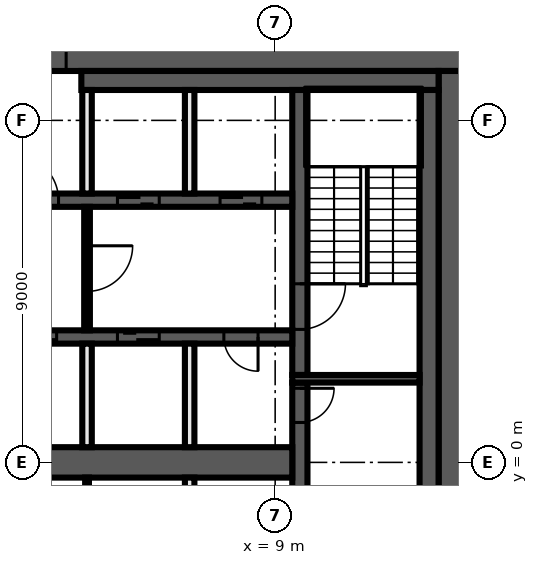
"""IFC4 building model, lengths in metres.
Left out: names, types, materials, properties, quantities, classifications, styles, units other than length and angle.
Written with IfcOpenShell. Run it as: python <this file> out.ifc"""

import sys

from ifc_helpers import new_model, si_unit, direction, frame, frame_2d, origin, place, context, subcontext, project, spatial, rectangle, extrude, element, fill, save


model = new_model("IFC4")
c1 = context("Model", 3, precision=1e-05, world=origin(), true_north=direction((0.0, 1.0)))
c2 = subcontext(c1, "Body", "Model", "MODEL_VIEW")
j1 = project(units=[si_unit("LENGTHUNIT", "METRE"), si_unit("PLANEANGLEUNIT", "RADIAN")], contexts=[c1])
p1 = place(None, origin())
s1 = spatial("IfcSite", under=j1, at=p1, CompositionType="ELEMENT")
p2 = place(p1, origin())
s2 = spatial("IfcBuilding", under=s1, at=p2, CompositionType="ELEMENT")
p3 = place(p2, frame((0.0, 0.0, 237.0)))
s3 = spatial("IfcBuildingStorey", under=s2, at=p3, CompositionType="ELEMENT", Elevation=237.0)
p4 = place(p3, frame((-14.0, 10.65, 0.0), z_axis=(0.0, 0.0, 1.0), x_axis=(1.0, 0.0, 0.0)))
e1 = element("IfcWall", 1, at=p4, inside=s3, PredefinedType="SHEAR", context=c2, shape_type="SweptSolid", body=[
    extrude(rectangle(XDim=28.0, YDim=0.7, at=frame_2d((14.0, 0.0))), origin(), (0.0, 0.0, 1.0), 3.82),
])
p5 = place(p4, frame((15.9, 0.0, 0.0)))
e2 = element("IfcOpeningElement", 2, at=p5, cuts=e1, PredefinedType="OPENING", context=c2, shape_type="SweptSolid", body=[
    extrude(rectangle(XDim=1.6, YDim=2.1, at=frame_2d((0.8, 1.05))), frame((0.0, 0.36, 0.0), z_axis=(0.0, -1.0, 0.0), x_axis=(1.0, 0.0, 0.0)), (0.0, 0.0, 1.0), 0.72),
])
p6 = place(p3, frame((13.65, 10.3, 0.0), z_axis=(0.0, 0.0, 1.0), x_axis=(0.0, -1.0, 0.0)))
e3 = element("IfcWall", 3, at=p6, inside=s3, PredefinedType="SHEAR", context=c2, shape_type="SweptSolid", body=[
    extrude(rectangle(XDim=20.6, YDim=0.7, at=frame_2d((10.3, 0.0))), origin(), (0.0, 0.0, 1.0), 3.82),
])
p7 = place(p3, frame((3.9, 10.05, 0.0), z_axis=(0.0, 0.0, 1.0), x_axis=(1.0, 0.0, 0.0)))
e4 = element("IfcWall", 4, at=p7, inside=s3, PredefinedType="SHEAR", context=c2, shape_type="SweptSolid", body=[
    extrude(rectangle(XDim=9.4, YDim=0.5, at=frame_2d((4.7, 0.0))), origin(), (0.0, 0.0, 1.0), 3.82),
])
p8 = place(p3, frame((13.05, 9.8, 0.0), z_axis=(0.0, 0.0, 1.0), x_axis=(0.0, -1.0, 0.0)))
e5 = element("IfcWall", 5, at=p8, inside=s3, PredefinedType="SHEAR", context=c2, shape_type="SweptSolid", body=[
    extrude(rectangle(XDim=19.6, YDim=0.5, at=frame_2d((9.8, 0.0))), origin(), (0.0, 0.0, 1.0), 3.82),
])
p9 = place(p3, frame((9.65, 2.1, 0.0), z_axis=(0.0, 0.0, 1.0), x_axis=(0.0, -1.0, 0.0)))
e6 = element("IfcWall", 6, at=p9, inside=s3, PredefinedType="SHEAR", context=c2, shape_type="SweptSolid", body=[
    extrude(rectangle(XDim=4.2, YDim=0.4, at=frame_2d((2.1, 0.0))), origin(), (0.0, 0.0, 1.0), 3.82),
])
p10 = place(p9, frame((0.15, 0.0, 0.0)))
e7 = element("IfcOpeningElement", 7, at=p10, cuts=e6, PredefinedType="OPENING", context=c2, shape_type="SweptSolid", body=[
    extrude(rectangle(XDim=0.9, YDim=2.1, at=frame_2d((0.45, 1.05))), frame((0.0, 0.21, 0.0), z_axis=(0.0, -1.0, 0.0), x_axis=(1.0, 0.0, 0.0)), (0.0, 0.0, 1.0), 0.42),
])
p11 = place(p3, frame((9.65, 9.8, 0.0), z_axis=(0.0, 0.0, 1.0), x_axis=(0.0, -1.0, 0.0)))
e8 = element("IfcWall", 8, at=p11, inside=s3, PredefinedType="SHEAR", context=c2, shape_type="SweptSolid", body=[
    extrude(rectangle(XDim=7.5, YDim=0.4, at=frame_2d((3.75, 0.0))), origin(), (0.0, 0.0, 1.0), 3.82),
])
p12 = place(p11, frame((5.1, 0.0, 0.0)))
e9 = element("IfcOpeningElement", 9, at=p12, cuts=e8, PredefinedType="OPENING", context=c2, shape_type="SweptSolid", body=[
    extrude(rectangle(XDim=1.2, YDim=2.1, at=frame_2d((0.6, 1.05))), frame((0.0, 0.21, 0.0), z_axis=(0.0, -1.0, 0.0), x_axis=(1.0, 0.0, 0.0)), (0.0, 0.0, 1.0), 0.42),
])
p13 = place(p3, frame((9.45, 2.2, 0.0), z_axis=(0.0, 0.0, 1.0), x_axis=(1.0, 0.0, 0.0)))
e10 = element("IfcWall", 10, at=p13, inside=s3, PredefinedType="SHEAR", context=c2, shape_type="SweptSolid", body=[
    extrude(rectangle(XDim=3.35, YDim=0.2, at=frame_2d((1.675, 0.0))), origin(), (0.0, 0.0, 1.0), 3.82),
])
p14 = place(p3, frame((-9.45, 6.9, 0.0), z_axis=(0.0, 0.0, 1.0), x_axis=(1.0, 0.0, 0.0)))
e11 = element("IfcWall", 11, at=p14, inside=s3, PredefinedType="SHEAR", context=c2, shape_type="SweptSolid", body=[
    extrude(rectangle(XDim=18.9, YDim=0.35, at=frame_2d((9.45, 0.0))), origin(), (0.0, 0.0, 1.0), 3.82),
])
p15 = place(p14, frame((11.55, 0.0, 0.0)))
e12 = element("IfcOpeningElement", 12, at=p15, cuts=e11, PredefinedType="OPENING", context=c2, shape_type="SweptSolid", body=[
    extrude(rectangle(XDim=1.2, YDim=2.1, at=frame_2d((0.6, 1.05))), frame((0.0, 0.185, 0.0), z_axis=(0.0, -1.0, 0.0), x_axis=(1.0, 0.0, 0.0)), (0.0, 0.0, 1.0), 0.37),
])
p16 = place(p14, frame((14.3, 0.0, 0.0)))
e13 = element("IfcOpeningElement", 13, at=p16, cuts=e11, PredefinedType="OPENING", context=c2, shape_type="SweptSolid", body=[
    extrude(rectangle(XDim=1.1, YDim=2.1, at=frame_2d((0.55, 1.05))), frame((0.0, 0.185, 0.0), z_axis=(0.0, -1.0, 0.0), x_axis=(1.0, 0.0, 0.0)), (0.0, 0.0, 1.0), 0.37),
])
p17 = place(p14, frame((17.0, 0.0, 0.0)))
e14 = element("IfcOpeningElement", 14, at=p17, cuts=e11, PredefinedType="OPENING", context=c2, shape_type="SweptSolid", body=[
    extrude(rectangle(XDim=1.1, YDim=2.1, at=frame_2d((0.55, 1.05))), frame((0.0, 0.185, 0.0), z_axis=(0.0, -1.0, 0.0), x_axis=(1.0, 0.0, 0.0)), (0.0, 0.0, 1.0), 0.37),
])
p18 = place(p14, frame((2.25, 0.0, 0.0)))
e15 = element("IfcOpeningElement", 15, at=p18, cuts=e11, PredefinedType="OPENING", context=c2, shape_type="SweptSolid", body=[
    extrude(rectangle(XDim=0.9, YDim=2.1, at=frame_2d((0.45, 1.05))), frame((0.0, 0.185, 0.0), z_axis=(0.0, -1.0, 0.0), x_axis=(1.0, 0.0, 0.0)), (0.0, 0.0, 1.0), 0.37),
])
p19 = place(p14, frame((7.65, 0.0, 0.0)))
e16 = element("IfcOpeningElement", 16, at=p19, cuts=e11, PredefinedType="OPENING", context=c2, shape_type="SweptSolid", body=[
    extrude(rectangle(XDim=0.9, YDim=2.1, at=frame_2d((0.45, 1.05))), frame((0.0, 0.185, 0.0), z_axis=(0.0, -1.0, 0.0), x_axis=(1.0, 0.0, 0.0)), (0.0, 0.0, 1.0), 0.37),
])
p20 = place(p3, frame((9.45, 3.3, 0.0), z_axis=(0.0, 0.0, 1.0), x_axis=(-1.0, 0.0, 0.0)))
e17 = element("IfcWall", 17, at=p20, inside=s3, PredefinedType="SHEAR", context=c2, shape_type="SweptSolid", body=[
    extrude(rectangle(XDim=18.9, YDim=0.35, at=frame_2d((9.45, 0.0))), origin(), (0.0, 0.0, 1.0), 3.82),
])
p21 = place(p20, frame((6.2, 0.0, 0.0)))
e18 = element("IfcOpeningElement", 18, at=p21, cuts=e17, PredefinedType="OPENING", context=c2, shape_type="SweptSolid", body=[
    extrude(rectangle(XDim=1.1, YDim=2.1, at=frame_2d((0.55, 1.05))), frame((0.0, 0.185, 0.0), z_axis=(0.0, -1.0, 0.0), x_axis=(1.0, 0.0, 0.0)), (0.0, 0.0, 1.0), 0.37),
])
p22 = place(p20, frame((3.5, 0.0, 0.0)))
e19 = element("IfcOpeningElement", 19, at=p22, cuts=e17, PredefinedType="OPENING", context=c2, shape_type="SweptSolid", body=[
    extrude(rectangle(XDim=1.1, YDim=2.1, at=frame_2d((0.55, 1.05))), frame((0.0, 0.185, 0.0), z_axis=(0.0, -1.0, 0.0), x_axis=(1.0, 0.0, 0.0)), (0.0, 0.0, 1.0), 0.37),
])
p23 = place(p20, frame((0.9, 0.0, 0.0)))
e20 = element("IfcOpeningElement", 20, at=p23, cuts=e17, PredefinedType="OPENING", context=c2, shape_type="SweptSolid", body=[
    extrude(rectangle(XDim=0.9, YDim=2.1, at=frame_2d((0.45, 1.05))), frame((0.0, 0.185, 0.0), z_axis=(0.0, -1.0, 0.0), x_axis=(1.0, 0.0, 0.0)), (0.0, 0.0, 1.0), 0.37),
])
p24 = place(p20, frame((17.1, 0.0, 0.0)))
e21 = element("IfcOpeningElement", 21, at=p24, cuts=e17, PredefinedType="OPENING", context=c2, shape_type="SweptSolid", body=[
    extrude(rectangle(XDim=0.9, YDim=2.1, at=frame_2d((0.45, 1.05))), frame((0.0, 0.185, 0.0), z_axis=(0.0, -1.0, 0.0), x_axis=(1.0, 0.0, 0.0)), (0.0, 0.0, 1.0), 0.37),
])
p25 = place(p20, frame((14.4, 0.0, 0.0)))
e22 = element("IfcOpeningElement", 22, at=p25, cuts=e17, PredefinedType="OPENING", context=c2, shape_type="SweptSolid", body=[
    extrude(rectangle(XDim=0.9, YDim=2.1, at=frame_2d((0.45, 1.05))), frame((0.0, 0.185, 0.0), z_axis=(0.0, -1.0, 0.0), x_axis=(1.0, 0.0, 0.0)), (0.0, 0.0, 1.0), 0.37),
])
p26 = place(p20, frame((11.7, 0.0, 0.0)))
e23 = element("IfcOpeningElement", 23, at=p26, cuts=e17, PredefinedType="OPENING", context=c2, shape_type="SweptSolid", body=[
    extrude(rectangle(XDim=0.9, YDim=2.1, at=frame_2d((0.45, 1.05))), frame((0.0, 0.185, 0.0), z_axis=(0.0, -1.0, 0.0), x_axis=(1.0, 0.0, 0.0)), (0.0, 0.0, 1.0), 0.37),
])
p27 = place(p20, frame((9.0, 0.0, 0.0)))
e24 = element("IfcOpeningElement", 24, at=p27, cuts=e17, PredefinedType="OPENING", context=c2, shape_type="SweptSolid", body=[
    extrude(rectangle(XDim=0.9, YDim=2.1, at=frame_2d((0.45, 1.05))), frame((0.0, 0.185, 0.0), z_axis=(0.0, -1.0, 0.0), x_axis=(1.0, 0.0, 0.0)), (0.0, 0.0, 1.0), 0.37),
])
p28 = place(p3, frame((-9.45, 0.0, 0.0), z_axis=(0.0, 0.0, 1.0), x_axis=(1.0, 0.0, 0.0)))
e25 = element("IfcWall", 25, at=p28, inside=s3, PredefinedType="SHEAR", context=c2, shape_type="SweptSolid", body=[
    extrude(rectangle(XDim=18.9, YDim=0.8, at=frame_2d((9.45, 0.0))), origin(), (0.0, 0.0, 1.0), 3.82),
])
for number, where, z_axis, x_axis in (
    (26, (6.75, -3.125, 0.0), (0.0, 0.0, 1.0), (0.0, 1.0, 0.0)),
    (27, (6.75, 0.4, 0.0), (0.0, 0.0, 1.0), (0.0, 1.0, 0.0)),
    (28, (6.75, 7.075, 0.0), (0.0, 0.0, 1.0), (0.0, 1.0, 0.0)),
):
    element("IfcWall", number, at=place(p3, frame(where, z_axis=z_axis, x_axis=x_axis)), inside=s3, PredefinedType="SOLIDWALL", context=c2, shape_type="SweptSolid", body=[
        extrude(rectangle(XDim=2.725, YDim=0.25, at=frame_2d((1.363, 0.0))), origin(), (0.0, 0.0, 1.0), 3.82),
    ])
p29 = place(p3, frame((4.05, 6.725, 0.0), z_axis=(0.0, 0.0, 1.0), x_axis=(0.0, -1.0, 0.0)))
e29 = element("IfcWall", 29, at=p29, inside=s3, PredefinedType="PARTITIONING", context=c2, shape_type="SweptSolid", body=[
    extrude(rectangle(XDim=3.25, YDim=0.15, at=frame_2d((1.625, 0.0))), origin(), (0.0, 0.0, 1.0), 3.82),
])
p30 = place(p29, frame((1.025, 0.0, 0.0)))
e30 = element("IfcOpeningElement", 30, at=p30, cuts=e29, PredefinedType="OPENING", context=c2, shape_type="SweptSolid", body=[
    extrude(rectangle(XDim=1.2, YDim=2.1, at=frame_2d((0.6, 1.05))), frame((0.0, 0.085, 0.0), z_axis=(0.0, -1.0, 0.0), x_axis=(1.0, 0.0, 0.0)), (0.0, 0.0, 1.0), 0.17),
])
p31 = place(p3, frame((4.05, -3.125, 0.0), z_axis=(0.0, 0.0, 1.0), x_axis=(0.0, 1.0, 0.0)))
e31 = element("IfcWall", 31, at=p31, inside=s3, PredefinedType="PARTITIONING", context=c2, shape_type="SweptSolid", body=[
    extrude(rectangle(XDim=2.725, YDim=0.1, at=frame_2d((1.363, 0.0))), origin(), (0.0, 0.0, 1.0), 3.82),
])
for number, where, z_axis, x_axis in (
    (32, (4.05, 0.4, 0.0), (0.0, 0.0, 1.0), (0.0, 1.0, 0.0)),
    (33, (4.05, 7.075, 0.0), (0.0, 0.0, 1.0), (0.0, 1.0, 0.0)),
):
    element("IfcWall", number, at=place(p3, frame(where, z_axis=z_axis, x_axis=x_axis)), inside=s3, PredefinedType="SOLIDWALL", context=c2, shape_type="SweptSolid", body=[
        extrude(rectangle(XDim=2.725, YDim=0.25, at=frame_2d((1.363, 0.0))), origin(), (0.0, 0.0, 1.0), 3.82),
    ])
p32 = place(p10, origin())
e34 = element("IfcDoor", 34, at=p32, inside=s3, OperationType="SINGLE_SWING_RIGHT", PredefinedType="DOOR", context=c2, shape_type="SweptSolid", body=[
    extrude(rectangle(XDim=0.9, YDim=2.1, at=frame_2d((0.45, 1.05))), frame((0.0, 0.025, 0.0), z_axis=(0.0, -1.0, 0.0), x_axis=(1.0, 0.0, 0.0)), (0.0, 0.0, 1.0), 0.05),
])
fill(e7, e34)
p33 = place(p5, origin())
e35 = element("IfcDoor", 35, at=p33, inside=s3, OperationType="DOUBLE_DOOR_SINGLE_SWING", PredefinedType="DOOR", context=c2, shape_type="SweptSolid", body=[
    extrude(rectangle(XDim=1.6, YDim=2.1, at=frame_2d((0.8, 1.05))), frame((0.0, 0.025, 0.0), z_axis=(0.0, -1.0, 0.0), x_axis=(1.0, 0.0, 0.0)), (0.0, 0.0, 1.0), 0.05),
])
fill(e2, e35)
p34 = place(p15, origin())
e36 = element("IfcDoor", 36, at=p34, inside=s3, OperationType="SINGLE_SWING_LEFT", PredefinedType="DOOR", context=c2, shape_type="SweptSolid", body=[
    extrude(rectangle(XDim=1.2, YDim=2.1, at=frame_2d((0.6, 1.05))), frame((0.0, 0.025, 0.0), z_axis=(0.0, -1.0, 0.0), x_axis=(1.0, 0.0, 0.0)), (0.0, 0.0, 1.0), 0.05),
])
fill(e12, e36)
p35 = place(p16, origin())
e37 = element("IfcDoor", 37, at=p35, inside=s3, OperationType="DOUBLE_DOOR_SLIDING", PredefinedType="DOOR", context=c2, shape_type="SweptSolid", body=[
    extrude(rectangle(XDim=1.1, YDim=2.1, at=frame_2d((0.55, 1.05))), frame((0.0, 0.025, 0.0), z_axis=(0.0, -1.0, 0.0), x_axis=(1.0, 0.0, 0.0)), (0.0, 0.0, 1.0), 0.05),
])
fill(e13, e37)
p36 = place(p17, origin())
e38 = element("IfcDoor", 38, at=p36, inside=s3, OperationType="DOUBLE_DOOR_SLIDING", PredefinedType="DOOR", context=c2, shape_type="SweptSolid", body=[
    extrude(rectangle(XDim=1.1, YDim=2.1, at=frame_2d((0.55, 1.05))), frame((0.0, 0.025, 0.0), z_axis=(0.0, -1.0, 0.0), x_axis=(1.0, 0.0, 0.0)), (0.0, 0.0, 1.0), 0.05),
])
fill(e14, e38)
p37 = place(p21, origin())
e39 = element("IfcDoor", 39, at=p37, inside=s3, OperationType="DOUBLE_DOOR_SLIDING", PredefinedType="DOOR", context=c2, shape_type="SweptSolid", body=[
    extrude(rectangle(XDim=1.1, YDim=2.1, at=frame_2d((0.55, 1.05))), frame((0.0, 0.025, 0.0), z_axis=(0.0, -1.0, 0.0), x_axis=(1.0, 0.0, 0.0)), (0.0, 0.0, 1.0), 0.05),
])
fill(e18, e39)
p38 = place(p22, origin())
e40 = element("IfcDoor", 40, at=p38, inside=s3, OperationType="DOUBLE_DOOR_SLIDING", PredefinedType="DOOR", context=c2, shape_type="SweptSolid", body=[
    extrude(rectangle(XDim=1.1, YDim=2.1, at=frame_2d((0.55, 1.05))), frame((0.0, 0.025, 0.0), z_axis=(0.0, -1.0, 0.0), x_axis=(1.0, 0.0, 0.0)), (0.0, 0.0, 1.0), 0.05),
])
fill(e19, e40)
p39 = place(p23, origin())
e41 = element("IfcDoor", 41, at=p39, inside=s3, OperationType="SINGLE_SWING_LEFT", PredefinedType="DOOR", context=c2, shape_type="SweptSolid", body=[
    extrude(rectangle(XDim=0.9, YDim=2.1, at=frame_2d((0.45, 1.05))), frame((0.0, 0.025, 0.0), z_axis=(0.0, -1.0, 0.0), x_axis=(1.0, 0.0, 0.0)), (0.0, 0.0, 1.0), 0.05),
])
fill(e20, e41)
p40 = place(p12, origin())
e42 = element("IfcDoor", 42, at=p40, inside=s3, OperationType="SINGLE_SWING_LEFT", PredefinedType="DOOR", context=c2, shape_type="SweptSolid", body=[
    extrude(rectangle(XDim=1.2, YDim=2.1, at=frame_2d((0.6, 1.05))), frame((0.0, 0.025, 0.0), z_axis=(0.0, -1.0, 0.0), x_axis=(1.0, 0.0, 0.0)), (0.0, 0.0, 1.0), 0.05),
])
fill(e9, e42)
p41 = place(p30, origin())
e43 = element("IfcDoor", 43, at=p41, inside=s3, OperationType="SINGLE_SWING_RIGHT", PredefinedType="DOOR", context=c2, shape_type="SweptSolid", body=[
    extrude(rectangle(XDim=1.2, YDim=2.1, at=frame_2d((0.6, 1.05))), frame((0.0, 0.025, 0.0), z_axis=(0.0, -1.0, 0.0), x_axis=(1.0, 0.0, 0.0)), (0.0, 0.0, 1.0), 0.05),
])
fill(e30, e43)
save(model, sys.argv[1])
